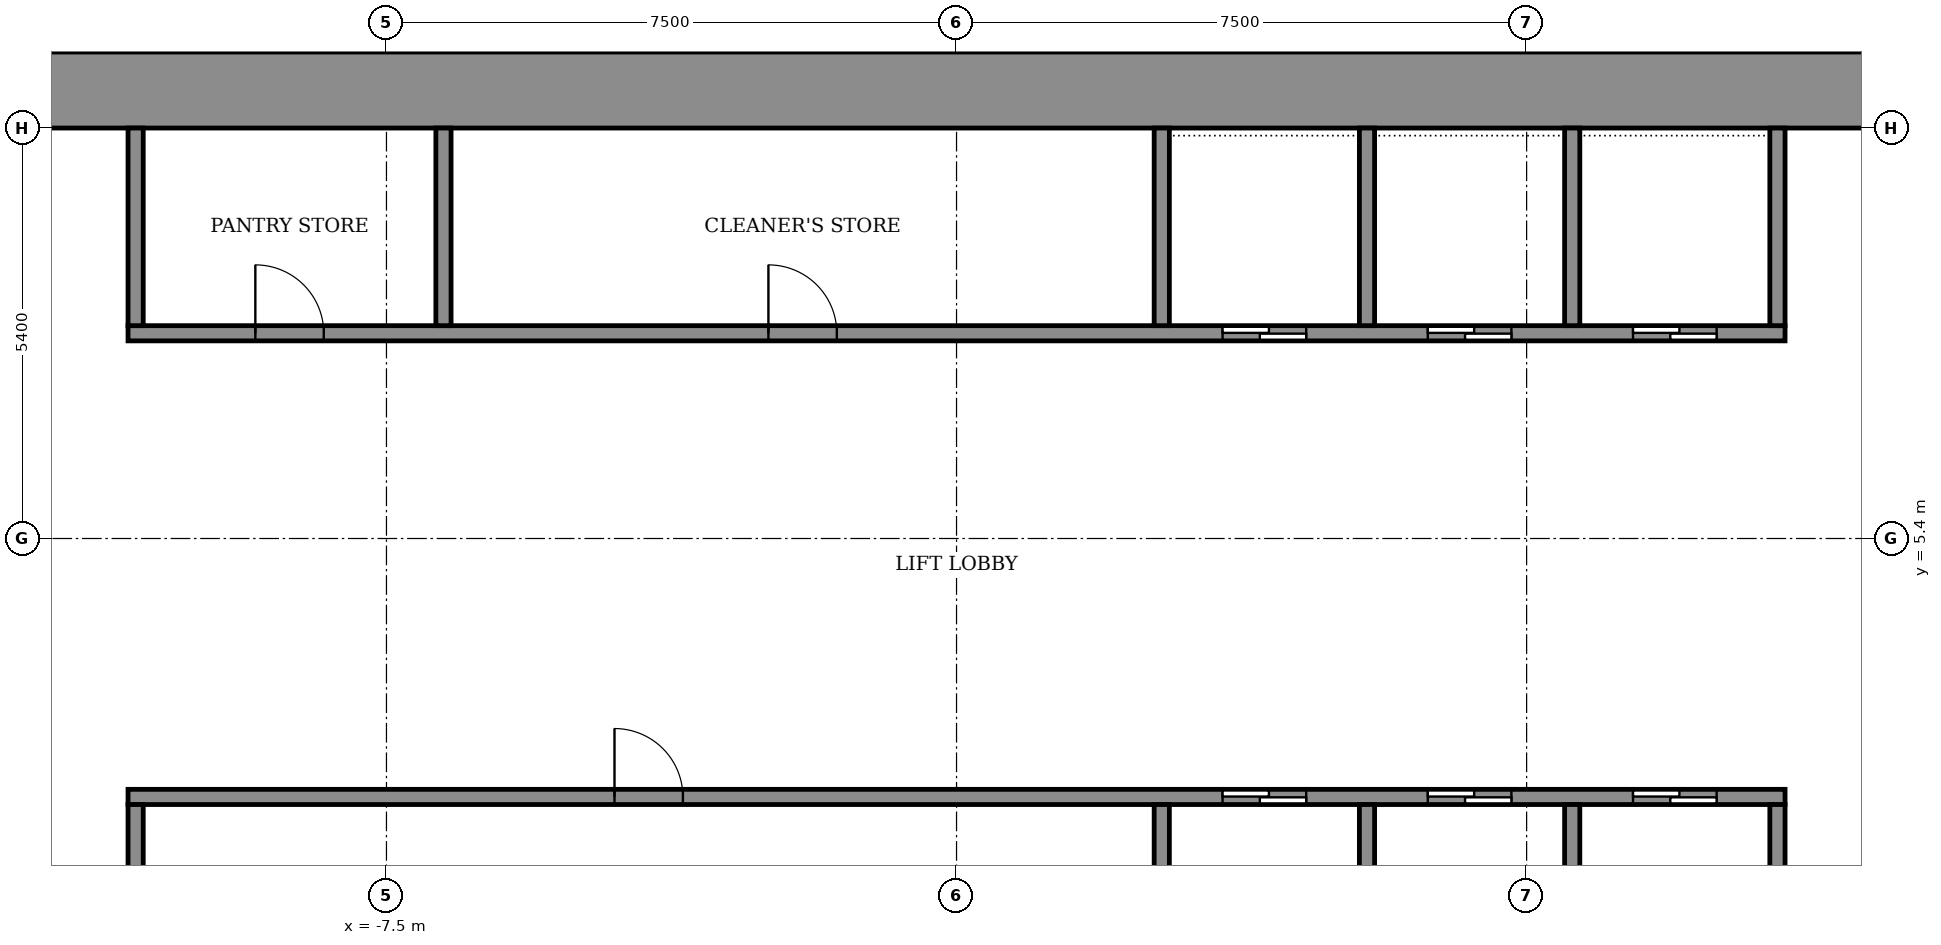
"""IFC4 building model, lengths in metres.
Left out: names, types, materials, properties, quantities, classifications, styles, units other than length and angle.
Written with IfcOpenShell. Run it as: python <this file> out.ifc"""

import sys

from ifc_helpers import new_model, si_unit, direction, frame, frame_2d, origin, place, context, subcontext, project, spatial, rectangle, extrude, element, fill, save


model = new_model("IFC4")
c1 = context("Model", 3, precision=1e-05, world=origin(), true_north=direction((0.0, 1.0)))
c2 = subcontext(c1, "Body", "Model", "MODEL_VIEW")
j1 = project(units=[si_unit("LENGTHUNIT", "METRE"), si_unit("PLANEANGLEUNIT", "RADIAN")], contexts=[c1])
p1 = place(None, origin())
s1 = spatial("IfcSite", under=j1, at=p1, CompositionType="ELEMENT")
p2 = place(p1, origin())
s2 = spatial("IfcBuilding", under=s1, at=p2, CompositionType="ELEMENT")
p3 = place(p2, frame((0.0, 0.0, 137.3)))
s3 = spatial("IfcBuildingStorey", under=s2, at=p3, CompositionType="ELEMENT", Elevation=137.3)
p4 = place(p3, frame((-14.8, 11.3, 0.0), z_axis=(0.0, 0.0, 1.0), x_axis=(1.0, 0.0, 0.0)))
e1 = element("IfcWall", 1, at=p4, inside=s3, PredefinedType="SHEAR", context=c2, shape_type="SweptSolid", body=[
    extrude(rectangle(XDim=29.6, YDim=1.0, at=frame_2d((14.8, 0.0))), origin(), (0.0, 0.0, 1.0), 3.6),
])
p5 = place(p3, frame((-10.9, 2.0, 0.0), z_axis=(0.0, 0.0, 1.0), x_axis=(1.0, 0.0, 0.0)))
e2 = element("IfcWall", 2, at=p5, inside=s3, PredefinedType="SHEAR", context=c2, shape_type="SweptSolid", body=[
    extrude(rectangle(XDim=21.8, YDim=0.2, at=frame_2d((10.9, 0.0))), origin(), (0.0, 0.0, 1.0), 3.05),
])
p6 = place(p5, frame((14.4, 0.0, 0.0)))
e3 = element("IfcOpeningElement", 3, at=p6, cuts=e2, PredefinedType="OPENING", context=c2, shape_type="SweptSolid", body=[
    extrude(rectangle(XDim=1.1, YDim=2.1, at=frame_2d((0.55, 1.05))), frame((0.0, 0.11, 0.0), z_axis=(0.0, -1.0, 0.0), x_axis=(1.0, 0.0, 0.0)), (0.0, 0.0, 1.0), 0.22),
])
p7 = place(p5, frame((17.1, 0.0, 0.0)))
e4 = element("IfcOpeningElement", 4, at=p7, cuts=e2, PredefinedType="OPENING", context=c2, shape_type="SweptSolid", body=[
    extrude(rectangle(XDim=1.1, YDim=2.1, at=frame_2d((0.55, 1.05))), frame((0.0, 0.11, 0.0), z_axis=(0.0, -1.0, 0.0), x_axis=(1.0, 0.0, 0.0)), (0.0, 0.0, 1.0), 0.22),
])
p8 = place(p5, frame((19.8, 0.0, 0.0)))
e5 = element("IfcOpeningElement", 5, at=p8, cuts=e2, PredefinedType="OPENING", context=c2, shape_type="SweptSolid", body=[
    extrude(rectangle(XDim=1.1, YDim=2.1, at=frame_2d((0.55, 1.05))), frame((0.0, 0.11, 0.0), z_axis=(0.0, -1.0, 0.0), x_axis=(1.0, 0.0, 0.0)), (0.0, 0.0, 1.0), 0.22),
])
p9 = place(p5, frame((6.4, 0.0, 0.0)))
e6 = element("IfcOpeningElement", 6, at=p9, cuts=e2, PredefinedType="OPENING", context=c2, shape_type="SweptSolid", body=[
    extrude(rectangle(XDim=0.9, YDim=2.1, at=frame_2d((0.45, 1.05))), frame((0.0, 0.11, 0.0), z_axis=(0.0, -1.0, 0.0), x_axis=(1.0, 0.0, 0.0)), (0.0, 0.0, 1.0), 0.22),
])
p10 = place(p3, frame((-10.9, 8.1, 0.0), z_axis=(0.0, 0.0, 1.0), x_axis=(1.0, 0.0, 0.0)))
e7 = element("IfcWall", 7, at=p10, inside=s3, PredefinedType="SHEAR", context=c2, shape_type="SweptSolid", body=[
    extrude(rectangle(XDim=21.8, YDim=0.2, at=frame_2d((10.9, 0.0))), origin(), (0.0, 0.0, 1.0), 3.05),
])
p11 = place(p10, frame((14.4, 0.0, 0.0)))
e8 = element("IfcOpeningElement", 8, at=p11, cuts=e7, PredefinedType="OPENING", context=c2, shape_type="SweptSolid", body=[
    extrude(rectangle(XDim=1.1, YDim=2.1, at=frame_2d((0.55, 1.05))), frame((0.0, 0.11, 0.0), z_axis=(0.0, -1.0, 0.0), x_axis=(1.0, 0.0, 0.0)), (0.0, 0.0, 1.0), 0.22),
])
p12 = place(p10, frame((17.1, 0.0, 0.0)))
e9 = element("IfcOpeningElement", 9, at=p12, cuts=e7, PredefinedType="OPENING", context=c2, shape_type="SweptSolid", body=[
    extrude(rectangle(XDim=1.1, YDim=2.1, at=frame_2d((0.55, 1.05))), frame((0.0, 0.11, 0.0), z_axis=(0.0, -1.0, 0.0), x_axis=(1.0, 0.0, 0.0)), (0.0, 0.0, 1.0), 0.22),
])
p13 = place(p10, frame((19.8, 0.0, 0.0)))
e10 = element("IfcOpeningElement", 10, at=p13, cuts=e7, PredefinedType="OPENING", context=c2, shape_type="SweptSolid", body=[
    extrude(rectangle(XDim=1.1, YDim=2.1, at=frame_2d((0.55, 1.05))), frame((0.0, 0.11, 0.0), z_axis=(0.0, -1.0, 0.0), x_axis=(1.0, 0.0, 0.0)), (0.0, 0.0, 1.0), 0.22),
])
p14 = place(p10, frame((1.675, 0.0, 0.0)))
e11 = element("IfcOpeningElement", 11, at=p14, cuts=e7, PredefinedType="OPENING", context=c2, shape_type="SweptSolid", body=[
    extrude(rectangle(XDim=0.9, YDim=2.1, at=frame_2d((0.45, 1.05))), frame((0.0, 0.11, 0.0), z_axis=(0.0, -1.0, 0.0), x_axis=(1.0, 0.0, 0.0)), (0.0, 0.0, 1.0), 0.22),
])
p15 = place(p10, frame((8.425, 0.0, 0.0)))
e12 = element("IfcOpeningElement", 12, at=p15, cuts=e7, PredefinedType="OPENING", context=c2, shape_type="SweptSolid", body=[
    extrude(rectangle(XDim=0.9, YDim=2.1, at=frame_2d((0.45, 1.05))), frame((0.0, 0.11, 0.0), z_axis=(0.0, -1.0, 0.0), x_axis=(1.0, 0.0, 0.0)), (0.0, 0.0, 1.0), 0.22),
])
p16 = place(p3, frame((-10.8, -0.6, 0.0), z_axis=(0.0, 0.0, 1.0), x_axis=(0.0, 1.0, 0.0)))
e13 = element("IfcWall", 13, at=p16, inside=s3, PredefinedType="STANDARD", context=c2, shape_type="SweptSolid", body=[
    extrude(rectangle(XDim=2.5, YDim=0.2, at=frame_2d((1.25, 0.0))), origin(), (0.0, 0.0, 1.0), 3.05),
])
for number, where, z_axis, x_axis in (
    (14, (2.7, -0.6, 0.0), (0.0, 0.0, 1.0), (0.0, 1.0, 0.0)),
    (15, (5.4, -0.6, 0.0), (0.0, 0.0, 1.0), (0.0, 1.0, 0.0)),
    (16, (8.1, -0.6, 0.0), (0.0, 0.0, 1.0), (0.0, 1.0, 0.0)),
    (17, (10.8, -0.6, 0.0), (0.0, 0.0, 1.0), (0.0, 1.0, 0.0)),
):
    element("IfcWall", number, at=place(p3, frame(where, z_axis=z_axis, x_axis=x_axis)), inside=s3, PredefinedType="SHEAR", context=c2, shape_type="SweptSolid", body=[
        extrude(rectangle(XDim=2.5, YDim=0.2, at=frame_2d((1.25, 0.0))), origin(), (0.0, 0.0, 1.0), 3.05),
    ])
for number, where, z_axis, x_axis in (
    (18, (-10.8, 8.2, 0.0), (0.0, 0.0, 1.0), (0.0, 1.0, 0.0)),
    (19, (-6.75, 8.2, 0.0), (0.0, 0.0, 1.0), (0.0, 1.0, 0.0)),
):
    element("IfcWall", number, at=place(p3, frame(where, z_axis=z_axis, x_axis=x_axis)), inside=s3, PredefinedType="STANDARD", context=c2, shape_type="SweptSolid", body=[
        extrude(rectangle(XDim=2.6, YDim=0.2, at=frame_2d((1.3, 0.0))), origin(), (0.0, 0.0, 1.0), 3.05),
    ])
for number, where, z_axis, x_axis in (
    (20, (2.7, 8.2, 0.0), (0.0, 0.0, 1.0), (0.0, 1.0, 0.0)),
    (21, (5.4, 8.2, 0.0), (0.0, 0.0, 1.0), (0.0, 1.0, 0.0)),
    (22, (8.1, 8.2, 0.0), (0.0, 0.0, 1.0), (0.0, 1.0, 0.0)),
    (23, (10.8, 8.2, 0.0), (0.0, 0.0, 1.0), (0.0, 1.0, 0.0)),
):
    element("IfcWall", number, at=place(p3, frame(where, z_axis=z_axis, x_axis=x_axis)), inside=s3, PredefinedType="SHEAR", context=c2, shape_type="SweptSolid", body=[
        extrude(rectangle(XDim=2.6, YDim=0.2, at=frame_2d((1.3, 0.0))), origin(), (0.0, 0.0, 1.0), 3.05),
    ])
p17 = place(p6, origin())
e24 = element("IfcDoor", 24, at=p17, inside=s3, OperationType="SLIDING_TO_LEFT", PredefinedType="DOOR", context=c2, shape_type="SweptSolid", body=[
    extrude(rectangle(XDim=1.1, YDim=2.1, at=frame_2d((0.55, 1.05))), frame((0.0, 0.025, 0.0), z_axis=(0.0, -1.0, 0.0), x_axis=(1.0, 0.0, 0.0)), (0.0, 0.0, 1.0), 0.05),
])
fill(e3, e24)
p18 = place(p7, origin())
e25 = element("IfcDoor", 25, at=p18, inside=s3, OperationType="SLIDING_TO_LEFT", PredefinedType="DOOR", context=c2, shape_type="SweptSolid", body=[
    extrude(rectangle(XDim=1.1, YDim=2.1, at=frame_2d((0.55, 1.05))), frame((0.0, 0.025, 0.0), z_axis=(0.0, -1.0, 0.0), x_axis=(1.0, 0.0, 0.0)), (0.0, 0.0, 1.0), 0.05),
])
fill(e4, e25)
p19 = place(p8, origin())
e26 = element("IfcDoor", 26, at=p19, inside=s3, OperationType="SLIDING_TO_LEFT", PredefinedType="DOOR", context=c2, shape_type="SweptSolid", body=[
    extrude(rectangle(XDim=1.1, YDim=2.1, at=frame_2d((0.55, 1.05))), frame((0.0, 0.025, 0.0), z_axis=(0.0, -1.0, 0.0), x_axis=(1.0, 0.0, 0.0)), (0.0, 0.0, 1.0), 0.05),
])
fill(e5, e26)
p20 = place(p11, origin())
e27 = element("IfcDoor", 27, at=p20, inside=s3, OperationType="SLIDING_TO_LEFT", PredefinedType="DOOR", context=c2, shape_type="SweptSolid", body=[
    extrude(rectangle(XDim=1.1, YDim=2.1, at=frame_2d((0.55, 1.05))), frame((0.0, 0.025, 0.0), z_axis=(0.0, -1.0, 0.0), x_axis=(1.0, 0.0, 0.0)), (0.0, 0.0, 1.0), 0.05),
])
fill(e8, e27)
p21 = place(p12, origin())
e28 = element("IfcDoor", 28, at=p21, inside=s3, OperationType="SLIDING_TO_LEFT", PredefinedType="DOOR", context=c2, shape_type="SweptSolid", body=[
    extrude(rectangle(XDim=1.1, YDim=2.1, at=frame_2d((0.55, 1.05))), frame((0.0, 0.025, 0.0), z_axis=(0.0, -1.0, 0.0), x_axis=(1.0, 0.0, 0.0)), (0.0, 0.0, 1.0), 0.05),
])
fill(e9, e28)
p22 = place(p13, origin())
e29 = element("IfcDoor", 29, at=p22, inside=s3, OperationType="SLIDING_TO_LEFT", PredefinedType="DOOR", context=c2, shape_type="SweptSolid", body=[
    extrude(rectangle(XDim=1.1, YDim=2.1, at=frame_2d((0.55, 1.05))), frame((0.0, 0.025, 0.0), z_axis=(0.0, -1.0, 0.0), x_axis=(1.0, 0.0, 0.0)), (0.0, 0.0, 1.0), 0.05),
])
fill(e10, e29)
p23 = place(p9, origin())
e30 = element("IfcDoor", 30, at=p23, inside=s3, OperationType="SINGLE_SWING_RIGHT", PredefinedType="DOOR", context=c2, shape_type="SweptSolid", body=[
    extrude(rectangle(XDim=0.9, YDim=2.1, at=frame_2d((0.45, 1.05))), frame((0.0, 0.025, 0.0), z_axis=(0.0, -1.0, 0.0), x_axis=(1.0, 0.0, 0.0)), (0.0, 0.0, 1.0), 0.05),
])
fill(e6, e30)
p24 = place(p14, origin())
e31 = element("IfcDoor", 31, at=p24, inside=s3, OperationType="SINGLE_SWING_RIGHT", PredefinedType="DOOR", context=c2, shape_type="SweptSolid", body=[
    extrude(rectangle(XDim=0.9, YDim=2.1, at=frame_2d((0.45, 1.05))), frame((0.0, 0.025, 0.0), z_axis=(0.0, -1.0, 0.0), x_axis=(1.0, 0.0, 0.0)), (0.0, 0.0, 1.0), 0.05),
])
fill(e11, e31)
p25 = place(p15, origin())
e32 = element("IfcDoor", 32, at=p25, inside=s3, OperationType="SINGLE_SWING_RIGHT", PredefinedType="DOOR", context=c2, shape_type="SweptSolid", body=[
    extrude(rectangle(XDim=0.9, YDim=2.1, at=frame_2d((0.45, 1.05))), frame((0.0, 0.025, 0.0), z_axis=(0.0, -1.0, 0.0), x_axis=(1.0, 0.0, 0.0)), (0.0, 0.0, 1.0), 0.05),
])
fill(e12, e32)
save(model, sys.argv[1])
